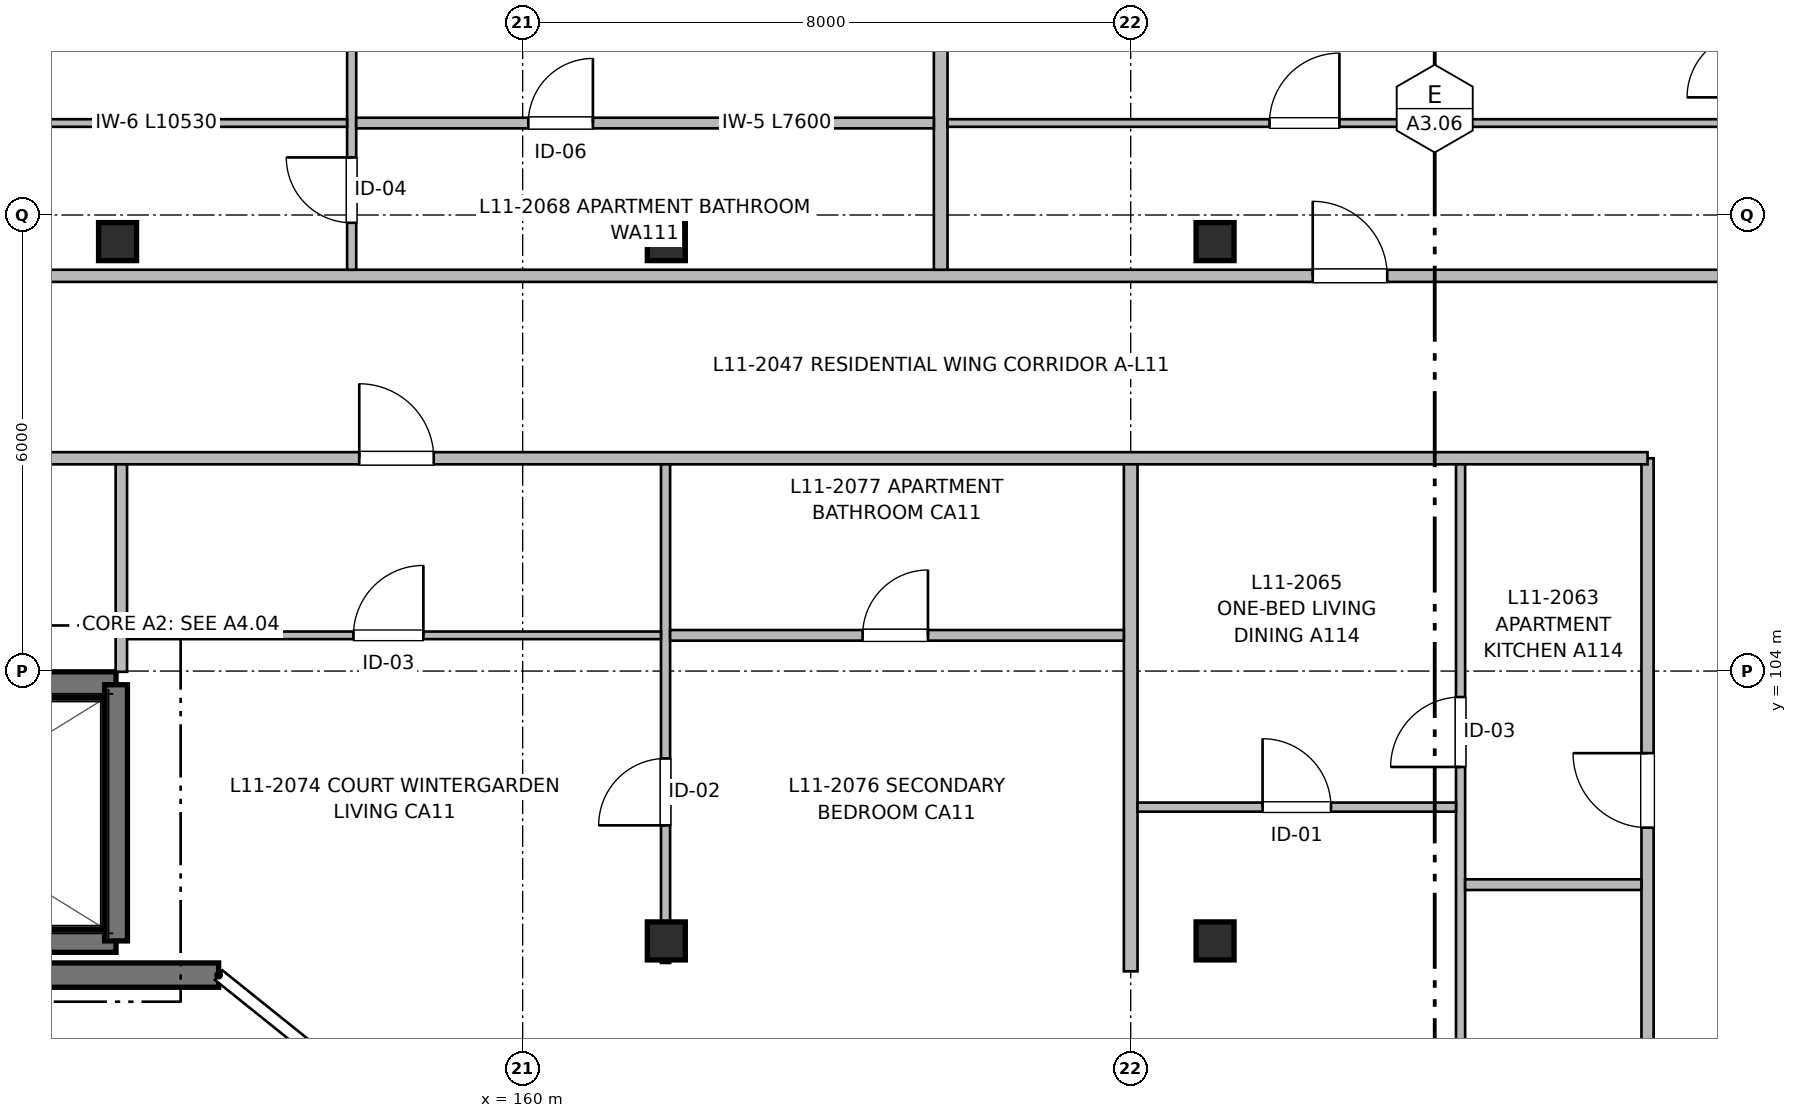
"""IFC4 building model, lengths in metres.
Left out: names, types, materials, properties, quantities, classifications, styles, units other than length and angle.
Written with IfcOpenShell. Run it as: python <this file> out.ifc"""

import sys

from ifc_helpers import new_model, si_unit, direction, frame, frame_2d, origin, origin_2d, place, context, subcontext, project, spatial, rectangle, extrude, element, fill, save


model = new_model("IFC4")
c1 = context("Model", 3, precision=1e-05, world=origin(), true_north=direction((0.0, 1.0)))
c2 = subcontext(c1, "Body", "Model", "MODEL_VIEW")
j1 = project(units=[si_unit("LENGTHUNIT", "METRE"), si_unit("PLANEANGLEUNIT", "RADIAN")], contexts=[c1])
p1 = place(None, origin())
s1 = spatial("IfcSite", under=j1, at=p1, CompositionType="ELEMENT")
p2 = place(p1, origin())
s2 = spatial("IfcBuilding", under=s1, at=p2, CompositionType="ELEMENT")
p3 = place(p2, frame((0.0, 0.0, 36.16)))
s3 = spatial("IfcBuildingStorey", under=s2, at=p3, CompositionType="ELEMENT", Elevation=36.16)
for number, where, z_axis, x_axis in (
    (1, (154.67, 109.65, 0.0), (0.0, 0.0, 1.0), (1.0, 0.0, 0.0)),
    (2, (161.89, 100.45, 0.0), (0.0, 0.0, 1.0), (1.0, 0.0, 0.0)),
    (3, (161.89, 109.65, 0.0), (0.0, 0.0, 1.0), (1.0, 0.0, 0.0)),
    (4, (169.11, 100.45, 0.0), (0.0, 0.0, 1.0), (1.0, 0.0, 0.0)),
    (5, (169.11, 109.65, 0.0), (0.0, 0.0, 1.0), (1.0, 0.0, 0.0)),
):
    element("IfcColumn", number, at=place(p3, frame(where, z_axis=z_axis, x_axis=x_axis)), inside=s3, PredefinedType="COLUMN", context=c2, shape_type="SweptSolid", body=[
        extrude(rectangle(XDim=0.5, YDim=0.5, at=origin_2d()), origin(), (0.0, 0.0, 1.0), 3.2),
    ])
p4 = place(p3, frame((147.75, 100.45, 0.0), z_axis=(0.0, 0.0, 1.0), x_axis=(1.0, 0.0, 0.0)))
e6 = element("IfcWall", 6, at=p4, inside=s3, PredefinedType="SHEAR", context=c2, shape_type="SweptSolid", body=[
    extrude(rectangle(XDim=6.9, YDim=0.3, at=frame_2d((3.45, 0.0))), origin(), (0.0, 0.0, 1.0), 3.2),
])
p5 = place(p3, frame((154.65, 103.82, 0.0), z_axis=(0.0, 0.0, 1.0), x_axis=(-1.0, 0.0, 0.0)))
e7 = element("IfcWall", 7, at=p5, inside=s3, PredefinedType="SHEAR", context=c2, shape_type="SweptSolid", body=[
    extrude(rectangle(XDim=6.9, YDim=0.34, at=frame_2d((3.45, 0.0))), origin(), (0.0, 0.0, 1.0), 3.2),
])
p6 = place(p5, frame((5.25, 0.0, 0.0)))
e8 = element("IfcOpeningElement", 8, at=p6, cuts=e7, PredefinedType="OPENING", context=c2, shape_type="SweptSolid", body=[
    extrude(rectangle(XDim=1.05, YDim=2.15, at=frame_2d((0.525, 1.075))), frame((0.0, 0.18, 0.0), z_axis=(0.0, -1.0, 0.0), x_axis=(1.0, 0.0, 0.0)), (0.0, 0.0, 1.0), 0.36),
])
p7 = place(p3, frame((154.65, 100.45, 0.0), z_axis=(0.0, 0.0, 1.0), x_axis=(0.0, 1.0, 0.0)))
e9 = element("IfcWall", 9, at=p7, inside=s3, PredefinedType="SHEAR", context=c2, shape_type="SweptSolid", body=[
    extrude(rectangle(XDim=3.37, YDim=0.3, at=frame_2d((1.685, 0.0))), origin(), (0.0, 0.0, 1.0), 3.2),
])
p8 = place(p3, frame((156.0, 100.0, 0.0), z_axis=(0.0, 0.0, 1.0), x_axis=(-1.0, 0.0, 0.0)))
e10 = element("IfcWall", 10, at=p8, inside=s3, PredefinedType="SHEAR", context=c2, shape_type="SweptSolid", body=[
    extrude(rectangle(XDim=9.0, YDim=0.32, at=frame_2d((4.5, 0.0))), origin(), (0.0, 0.0, 1.0), 2.98),
])
p9 = place(p8, frame((4.175, 0.0, 0.9)))
e11 = element("IfcOpeningElement", 11, at=p9, cuts=e10, PredefinedType="OPENING", context=c2, shape_type="SweptSolid", body=[
    extrude(rectangle(XDim=0.65, YDim=0.95, at=frame_2d((0.325, 0.475))), frame((0.0, 0.17, 0.0), z_axis=(0.0, -1.0, 0.0), x_axis=(1.0, 0.0, 0.0)), (0.0, 0.0, 1.0), 0.34),
])
p10 = place(p3, frame((174.8, 61.76, 0.0), z_axis=(0.0, 0.0, 1.0), x_axis=(0.0, 1.0, 0.0)))
e12 = element("IfcWall", 12, at=p10, inside=s3, PredefinedType="PARTITIONING", context=c2, shape_type="SweptSolid", body=[
    extrude(rectangle(XDim=45.04, YDim=0.16, at=frame_2d((22.52, 0.0))), origin(), (0.0, 0.0, 1.0), 2.935),
])
p11 = place(p10, frame((6.29, 0.0, 0.0)))
e13 = element("IfcOpeningElement", 13, at=p11, cuts=e12, PredefinedType="OPENING", context=c2, shape_type="SweptSolid", body=[
    extrude(rectangle(XDim=0.98, YDim=2.15, at=frame_2d((0.49, 1.075))), frame((0.0, 0.09, 0.0), z_axis=(0.0, -1.0, 0.0), x_axis=(1.0, 0.0, 0.0)), (0.0, 0.0, 1.0), 0.18),
])
p12 = place(p10, frame((19.09, 0.0, 0.0)))
e14 = element("IfcOpeningElement", 14, at=p12, cuts=e12, PredefinedType="OPENING", context=c2, shape_type="SweptSolid", body=[
    extrude(rectangle(XDim=1.02, YDim=2.15, at=frame_2d((0.51, 1.075))), frame((0.0, 0.09, 0.0), z_axis=(0.0, -1.0, 0.0), x_axis=(1.0, 0.0, 0.0)), (0.0, 0.0, 1.0), 0.18),
])
p13 = place(p10, frame((30.04, 0.0, 0.0)))
e15 = element("IfcOpeningElement", 15, at=p13, cuts=e12, PredefinedType="OPENING", context=c2, shape_type="SweptSolid", body=[
    extrude(rectangle(XDim=0.98, YDim=2.15, at=frame_2d((0.49, 1.075))), frame((0.0, 0.09, 0.0), z_axis=(0.0, -1.0, 0.0), x_axis=(1.0, 0.0, 0.0)), (0.0, 0.0, 1.0), 0.18),
])
p14 = place(p10, frame((40.18, 0.0, 0.0)))
e16 = element("IfcOpeningElement", 16, at=p14, cuts=e12, PredefinedType="OPENING", context=c2, shape_type="SweptSolid", body=[
    extrude(rectangle(XDim=0.98, YDim=2.15, at=frame_2d((0.49, 1.075))), frame((0.0, 0.09, 0.0), z_axis=(0.0, -1.0, 0.0), x_axis=(1.0, 0.0, 0.0)), (0.0, 0.0, 1.0), 0.18),
])
p15 = place(p3, frame((147.16, 106.8, 0.0), z_axis=(0.0, 0.0, 1.0), x_axis=(1.0, 0.0, 0.0)))
e17 = element("IfcWall", 17, at=p15, inside=s3, PredefinedType="PARTITIONING", context=c2, shape_type="SweptSolid", body=[
    extrude(rectangle(XDim=27.64, YDim=0.16, at=frame_2d((13.82, 0.0))), origin(), (0.0, 0.0, 1.0), 2.935),
])
p16 = place(p15, frame((3.515, 0.0, 0.0)))
e18 = element("IfcOpeningElement", 18, at=p16, cuts=e17, PredefinedType="OPENING", context=c2, shape_type="SweptSolid", body=[
    extrude(rectangle(XDim=1.05, YDim=2.15, at=frame_2d((0.525, 1.075))), frame((0.0, 0.09, 0.0), z_axis=(0.0, -1.0, 0.0), x_axis=(1.0, 0.0, 0.0)), (0.0, 0.0, 1.0), 0.18),
])
p17 = place(p15, frame((10.69, 0.0, 0.0)))
e19 = element("IfcOpeningElement", 19, at=p17, cuts=e17, PredefinedType="OPENING", context=c2, shape_type="SweptSolid", body=[
    extrude(rectangle(XDim=0.98, YDim=2.15, at=frame_2d((0.49, 1.075))), frame((0.0, 0.09, 0.0), z_axis=(0.0, -1.0, 0.0), x_axis=(1.0, 0.0, 0.0)), (0.0, 0.0, 1.0), 0.18),
])
p18 = place(p3, frame((147.16, 109.2, 0.0), z_axis=(0.0, 0.0, 1.0), x_axis=(1.0, 0.0, 0.0)))
e20 = element("IfcWall", 20, at=p18, inside=s3, PredefinedType="PARTITIONING", context=c2, shape_type="SweptSolid", body=[
    extrude(rectangle(XDim=36.68, YDim=0.16, at=frame_2d((18.34, 0.0))), origin(), (0.0, 0.0, 1.0), 2.935),
])
p19 = place(p18, frame((4.805, 0.0, 0.0)))
e21 = element("IfcOpeningElement", 21, at=p19, cuts=e20, PredefinedType="OPENING", context=c2, shape_type="SweptSolid", body=[
    extrude(rectangle(XDim=0.98, YDim=2.15, at=frame_2d((0.49, 1.075))), frame((0.0, 0.09, 0.0), z_axis=(0.0, -1.0, 0.0), x_axis=(1.0, 0.0, 0.0)), (0.0, 0.0, 1.0), 0.18),
])
p20 = place(p18, frame((23.235, 0.0, 0.0)))
e22 = element("IfcOpeningElement", 22, at=p20, cuts=e20, PredefinedType="OPENING", context=c2, shape_type="SweptSolid", body=[
    extrude(rectangle(XDim=0.98, YDim=2.15, at=frame_2d((0.49, 1.075))), frame((0.0, 0.09, 0.0), z_axis=(0.0, -1.0, 0.0), x_axis=(1.0, 0.0, 0.0)), (0.0, 0.0, 1.0), 0.18),
])
p21 = place(p3, frame((168.0, 100.05, 0.0), z_axis=(0.0, 0.0, 1.0), x_axis=(0.0, 1.0, 0.0)))
e23 = element("IfcWall", 23, at=p21, inside=s3, PredefinedType="PARTITIONING", context=c2, shape_type="SweptSolid", body=[
    extrude(rectangle(XDim=6.67, YDim=0.18, at=frame_2d((3.335, 0.0))), origin(), (0.0, 0.0, 1.0), 2.935),
])
p22 = place(p3, frame((154.72, 103.99, 0.0), z_axis=(0.0, 0.0, 1.0), x_axis=(0.0, 1.0, 0.0)))
e24 = element("IfcWall", 24, at=p22, inside=s3, PredefinedType="PARTITIONING", context=c2, shape_type="SweptSolid", body=[
    extrude(rectangle(XDim=2.73, YDim=0.15, at=frame_2d((1.365, 0.0))), origin(), (0.0, 0.0, 1.0), 2.935),
])
p23 = place(p3, frame((172.34, 96.47, 0.0), z_axis=(0.0, 0.0, 1.0), x_axis=(0.0, 1.0, 0.0)))
e25 = element("IfcWall", 25, at=p23, inside=s3, PredefinedType="PARTITIONING", context=c2, shape_type="SweptSolid", body=[
    extrude(rectangle(XDim=10.25, YDim=0.12, at=frame_2d((5.125, 0.0))), origin(), (0.0, 0.0, 1.0), 2.935),
])
p24 = place(p23, frame((1.794, 0.0, 0.0)))
e26 = element("IfcOpeningElement", 26, at=p24, cuts=e25, PredefinedType="OPENING", context=c2, shape_type="SweptSolid", body=[
    extrude(rectangle(XDim=0.86, YDim=2.1, at=frame_2d((0.43, 1.05))), frame((0.0, 0.07, 0.0), z_axis=(0.0, -1.0, 0.0), x_axis=(1.0, 0.0, 0.0)), (0.0, 0.0, 1.0), 0.14),
])
p25 = place(p23, frame((6.268, 0.0, 0.0)))
e27 = element("IfcOpeningElement", 27, at=p25, cuts=e25, PredefinedType="OPENING", context=c2, shape_type="SweptSolid", body=[
    extrude(rectangle(XDim=0.92, YDim=2.1, at=frame_2d((0.46, 1.05))), frame((0.0, 0.07, 0.0), z_axis=(0.0, -1.0, 0.0), x_axis=(1.0, 0.0, 0.0)), (0.0, 0.0, 1.0), 0.14),
])
p26 = place(p3, frame((172.4, 101.19, 0.0), z_axis=(0.0, 0.0, 1.0), x_axis=(1.0, 0.0, 0.0)))
e28 = element("IfcWall", 28, at=p26, inside=s3, PredefinedType="PARTITIONING", context=c2, shape_type="SweptSolid", body=[
    extrude(rectangle(XDim=2.32, YDim=0.14, at=frame_2d((1.16, 0.0))), origin(), (0.0, 0.0, 1.0), 2.935),
])
p27 = place(p3, frame((168.09, 102.21, 0.0), z_axis=(0.0, 0.0, 1.0), x_axis=(1.0, 0.0, 0.0)))
e29 = element("IfcWall", 29, at=p27, inside=s3, PredefinedType="PARTITIONING", context=c2, shape_type="SweptSolid", body=[
    extrude(rectangle(XDim=4.19, YDim=0.12, at=frame_2d((2.095, 0.0))), origin(), (0.0, 0.0, 1.0), 2.935),
])
p28 = place(p27, frame((1.645, 0.0, 0.0)))
e30 = element("IfcOpeningElement", 30, at=p28, cuts=e29, PredefinedType="OPENING", context=c2, shape_type="SweptSolid", body=[
    extrude(rectangle(XDim=0.9, YDim=2.1, at=frame_2d((0.45, 1.05))), frame((0.0, 0.07, 0.0), z_axis=(0.0, -1.0, 0.0), x_axis=(1.0, 0.0, 0.0)), (0.0, 0.0, 1.0), 0.14),
])
p29 = place(p3, frame((165.5, 109.28, 0.0), z_axis=(0.0, 0.0, 1.0), x_axis=(0.0, 1.0, 0.0)))
e31 = element("IfcWall", 31, at=p29, inside=s3, PredefinedType="PARTITIONING", context=c2, shape_type="SweptSolid", body=[
    extrude(rectangle(XDim=4.19, YDim=0.18, at=frame_2d((2.095, 0.0))), origin(), (0.0, 0.0, 1.0), 2.935),
])
p30 = place(p3, frame((157.75, 109.28, 0.0), z_axis=(0.0, 0.0, 1.0), x_axis=(0.0, 1.0, 0.0)))
e32 = element("IfcWall", 32, at=p30, inside=s3, PredefinedType="PARTITIONING", context=c2, shape_type="SweptSolid", body=[
    extrude(rectangle(XDim=4.19, YDim=0.12, at=frame_2d((2.095, 0.0))), origin(), (0.0, 0.0, 1.0), 2.935),
])
p31 = place(p30, frame((0.618, 0.0, 0.0)))
e33 = element("IfcOpeningElement", 33, at=p31, cuts=e32, PredefinedType="OPENING", context=c2, shape_type="SweptSolid", body=[
    extrude(rectangle(XDim=0.86, YDim=2.1, at=frame_2d((0.43, 1.05))), frame((0.0, 0.07, 0.0), z_axis=(0.0, -1.0, 0.0), x_axis=(1.0, 0.0, 0.0)), (0.0, 0.0, 1.0), 0.14),
])
p32 = place(p30, frame((2.947, 0.0, 0.0)))
e34 = element("IfcOpeningElement", 34, at=p32, cuts=e32, PredefinedType="OPENING", context=c2, shape_type="SweptSolid", body=[
    extrude(rectangle(XDim=0.9, YDim=2.1, at=frame_2d((0.45, 1.05))), frame((0.0, 0.07, 0.0), z_axis=(0.0, -1.0, 0.0), x_axis=(1.0, 0.0, 0.0)), (0.0, 0.0, 1.0), 0.14),
])
p33 = place(p3, frame((157.81, 111.21, 0.0), z_axis=(0.0, 0.0, 1.0), x_axis=(1.0, 0.0, 0.0)))
e35 = element("IfcWall", 35, at=p33, inside=s3, PredefinedType="PARTITIONING", context=c2, shape_type="SweptSolid", body=[
    extrude(rectangle(XDim=7.6, YDim=0.14, at=frame_2d((3.8, 0.0))), origin(), (0.0, 0.0, 1.0), 2.935),
])
p34 = place(p33, frame((2.264, 0.0, 0.0)))
e36 = element("IfcOpeningElement", 36, at=p34, cuts=e35, PredefinedType="OPENING", context=c2, shape_type="SweptSolid", body=[
    extrude(rectangle(XDim=0.85, YDim=2.05, at=frame_2d((0.425, 1.025))), frame((0.0, 0.08, 0.0), z_axis=(0.0, -1.0, 0.0), x_axis=(1.0, 0.0, 0.0)), (0.0, 0.0, 1.0), 0.16),
])
p35 = place(p3, frame((147.16, 111.21, 0.0), z_axis=(0.0, 0.0, 1.0), x_axis=(1.0, 0.0, 0.0)))
e37 = element("IfcWall", 37, at=p35, inside=s3, PredefinedType="PARTITIONING", context=c2, shape_type="SweptSolid", body=[
    extrude(rectangle(XDim=10.53, YDim=0.1, at=frame_2d((5.265, 0.0))), origin(), (0.0, 0.0, 1.0), 2.935),
])
p36 = place(p35, frame((4.236, 0.0, 0.0)))
e38 = element("IfcOpeningElement", 38, at=p36, cuts=e37, PredefinedType="OPENING", context=c2, shape_type="SweptSolid", body=[
    extrude(rectangle(XDim=0.92, YDim=2.1, at=frame_2d((0.46, 1.05))), frame((0.0, 0.06, 0.0), z_axis=(0.0, -1.0, 0.0), x_axis=(1.0, 0.0, 0.0)), (0.0, 0.0, 1.0), 0.12),
])
p37 = place(p3, frame((165.59, 111.21, 0.0), z_axis=(0.0, 0.0, 1.0), x_axis=(1.0, 0.0, 0.0)))
e39 = element("IfcWall", 39, at=p37, inside=s3, PredefinedType="PARTITIONING", context=c2, shape_type="SweptSolid", body=[
    extrude(rectangle(XDim=10.53, YDim=0.1, at=frame_2d((5.265, 0.0))), origin(), (0.0, 0.0, 1.0), 2.935),
])
p38 = place(p37, frame((4.236, 0.0, 0.0)))
e40 = element("IfcOpeningElement", 40, at=p38, cuts=e39, PredefinedType="OPENING", context=c2, shape_type="SweptSolid", body=[
    extrude(rectangle(XDim=0.92, YDim=2.1, at=frame_2d((0.46, 1.05))), frame((0.0, 0.06, 0.0), z_axis=(0.0, -1.0, 0.0), x_axis=(1.0, 0.0, 0.0)), (0.0, 0.0, 1.0), 0.12),
])
p39 = place(p3, frame((161.88, 100.16, 0.0), z_axis=(0.0, 0.0, 1.0), x_axis=(0.0, 1.0, 0.0)))
e41 = element("IfcWall", 41, at=p39, inside=s3, PredefinedType="PARTITIONING", context=c2, shape_type="SweptSolid", body=[
    extrude(rectangle(XDim=6.56, YDim=0.12, at=frame_2d((3.28, 0.0))), origin(), (0.0, 0.0, 1.0), 2.68),
])
p40 = place(p39, frame((1.81, 0.0, 0.0)))
e42 = element("IfcOpeningElement", 42, at=p40, cuts=e41, PredefinedType="OPENING", context=c2, shape_type="SweptSolid", body=[
    extrude(rectangle(XDim=0.88, YDim=2.1, at=frame_2d((0.44, 1.05))), frame((0.0, 0.07, 0.0), z_axis=(0.0, -1.0, 0.0), x_axis=(1.0, 0.0, 0.0)), (0.0, 0.0, 1.0), 0.14),
])
p41 = place(p3, frame((161.94, 104.47, 0.0), z_axis=(0.0, 0.0, 1.0), x_axis=(1.0, 0.0, 0.0)))
e43 = element("IfcWall", 43, at=p41, inside=s3, PredefinedType="PARTITIONING", context=c2, shape_type="SweptSolid", body=[
    extrude(rectangle(XDim=5.97, YDim=0.14, at=frame_2d((2.985, 0.0))), origin(), (0.0, 0.0, 1.0), 2.935),
])
p42 = place(p41, frame((2.533, 0.0, 0.0)))
e44 = element("IfcOpeningElement", 44, at=p42, cuts=e43, PredefinedType="OPENING", context=c2, shape_type="SweptSolid", body=[
    extrude(rectangle(XDim=0.86, YDim=2.1, at=frame_2d((0.43, 1.05))), frame((0.0, 0.08, 0.0), z_axis=(0.0, -1.0, 0.0), x_axis=(1.0, 0.0, 0.0)), (0.0, 0.0, 1.0), 0.16),
])
p43 = place(p3, frame((154.8, 104.47, 0.0), z_axis=(0.0, 0.0, 1.0), x_axis=(1.0, 0.0, 0.0)))
e45 = element("IfcWall", 45, at=p43, inside=s3, PredefinedType="PARTITIONING", context=c2, shape_type="SweptSolid", body=[
    extrude(rectangle(XDim=7.02, YDim=0.1, at=frame_2d((3.51, 0.0))), origin(), (0.0, 0.0, 1.0), 2.935),
])
p44 = place(p43, frame((2.974, 0.0, 0.0)))
e46 = element("IfcOpeningElement", 46, at=p44, cuts=e45, PredefinedType="OPENING", context=c2, shape_type="SweptSolid", body=[
    extrude(rectangle(XDim=0.92, YDim=2.1, at=frame_2d((0.46, 1.05))), frame((0.0, 0.06, 0.0), z_axis=(0.0, -1.0, 0.0), x_axis=(1.0, 0.0, 0.0)), (0.0, 0.0, 1.0), 0.12),
])
p45 = place(p25, origin())
e47 = element("IfcDoor", 47, at=p45, inside=s3, OperationType="SINGLE_SWING_LEFT", PredefinedType="DOOR", context=c2, shape_type="SweptSolid", body=[
    extrude(rectangle(XDim=0.92, YDim=2.1, at=frame_2d((0.46, 1.05))), frame((0.0, 0.025, 0.0), z_axis=(0.0, -1.0, 0.0), x_axis=(1.0, 0.0, 0.0)), (0.0, 0.0, 1.0), 0.05),
])
fill(e27, e47)
p46 = place(p14, origin())
e48 = element("IfcDoor", 48, at=p46, inside=s3, OperationType="SINGLE_SWING_RIGHT", PredefinedType="DOOR", context=c2, shape_type="SweptSolid", body=[
    extrude(rectangle(XDim=0.98, YDim=2.15, at=frame_2d((0.49, 1.075))), frame((0.0, 0.025, 0.0), z_axis=(0.0, -1.0, 0.0), x_axis=(1.0, 0.0, 0.0)), (0.0, 0.0, 1.0), 0.05),
])
fill(e16, e48)
p47 = place(p28, origin())
e49 = element("IfcDoor", 49, at=p47, inside=s3, OperationType="SINGLE_SWING_LEFT", PredefinedType="DOOR", context=c2, shape_type="SweptSolid", body=[
    extrude(rectangle(XDim=0.9, YDim=2.1, at=frame_2d((0.45, 1.05))), frame((0.0, 0.025, 0.0), z_axis=(0.0, -1.0, 0.0), x_axis=(1.0, 0.0, 0.0)), (0.0, 0.0, 1.0), 0.05),
])
fill(e30, e49)
p48 = place(p31, origin())
e50 = element("IfcDoor", 50, at=p48, inside=s3, OperationType="SINGLE_SWING_RIGHT", PredefinedType="DOOR", context=c2, shape_type="SweptSolid", body=[
    extrude(rectangle(XDim=0.86, YDim=2.1, at=frame_2d((0.43, 1.05))), frame((0.0, 0.025, 0.0), z_axis=(0.0, -1.0, 0.0), x_axis=(1.0, 0.0, 0.0)), (0.0, 0.0, 1.0), 0.05),
])
fill(e33, e50)
p49 = place(p34, origin())
e51 = element("IfcDoor", 51, at=p49, inside=s3, OperationType="SINGLE_SWING_RIGHT", PredefinedType="DOOR", context=c2, shape_type="SweptSolid", body=[
    extrude(rectangle(XDim=0.85, YDim=2.05, at=frame_2d((0.425, 1.025))), frame((0.0, 0.025, 0.0), z_axis=(0.0, -1.0, 0.0), x_axis=(1.0, 0.0, 0.0)), (0.0, 0.0, 1.0), 0.05),
])
fill(e36, e51)
p50 = place(p20, origin())
e52 = element("IfcDoor", 52, at=p50, inside=s3, OperationType="SINGLE_SWING_LEFT", PredefinedType="DOOR", context=c2, shape_type="SweptSolid", body=[
    extrude(rectangle(XDim=0.98, YDim=2.15, at=frame_2d((0.49, 1.075))), frame((0.0, 0.025, 0.0), z_axis=(0.0, -1.0, 0.0), x_axis=(1.0, 0.0, 0.0)), (0.0, 0.0, 1.0), 0.05),
])
fill(e22, e52)
p51 = place(p38, origin())
e53 = element("IfcDoor", 53, at=p51, inside=s3, OperationType="SINGLE_SWING_RIGHT", PredefinedType="DOOR", context=c2, shape_type="SweptSolid", body=[
    extrude(rectangle(XDim=0.92, YDim=2.1, at=frame_2d((0.46, 1.05))), frame((0.0, 0.025, 0.0), z_axis=(0.0, -1.0, 0.0), x_axis=(1.0, 0.0, 0.0)), (0.0, 0.0, 1.0), 0.05),
])
fill(e40, e53)
p52 = place(p17, origin())
e54 = element("IfcDoor", 54, at=p52, inside=s3, OperationType="SINGLE_SWING_LEFT", PredefinedType="DOOR", context=c2, shape_type="SweptSolid", body=[
    extrude(rectangle(XDim=0.98, YDim=2.15, at=frame_2d((0.49, 1.075))), frame((0.0, 0.025, 0.0), z_axis=(0.0, -1.0, 0.0), x_axis=(1.0, 0.0, 0.0)), (0.0, 0.0, 1.0), 0.05),
])
fill(e19, e54)
p53 = place(p44, origin())
e55 = element("IfcDoor", 55, at=p53, inside=s3, OperationType="SINGLE_SWING_RIGHT", PredefinedType="DOOR", context=c2, shape_type="SweptSolid", body=[
    extrude(rectangle(XDim=0.92, YDim=2.1, at=frame_2d((0.46, 1.05))), frame((0.0, 0.025, 0.0), z_axis=(0.0, -1.0, 0.0), x_axis=(1.0, 0.0, 0.0)), (0.0, 0.0, 1.0), 0.05),
])
fill(e46, e55)
p54 = place(p40, origin())
e56 = element("IfcDoor", 56, at=p54, inside=s3, OperationType="SINGLE_SWING_LEFT", PredefinedType="DOOR", context=c2, shape_type="SweptSolid", body=[
    extrude(rectangle(XDim=0.88, YDim=2.1, at=frame_2d((0.44, 1.05))), frame((0.0, 0.025, 0.0), z_axis=(0.0, -1.0, 0.0), x_axis=(1.0, 0.0, 0.0)), (0.0, 0.0, 1.0), 0.05),
])
fill(e42, e56)
p55 = place(p42, origin())
e57 = element("IfcDoor", 57, at=p55, inside=s3, OperationType="SINGLE_SWING_RIGHT", PredefinedType="DOOR", context=c2, shape_type="SweptSolid", body=[
    extrude(rectangle(XDim=0.86, YDim=2.1, at=frame_2d((0.43, 1.05))), frame((0.0, 0.025, 0.0), z_axis=(0.0, -1.0, 0.0), x_axis=(1.0, 0.0, 0.0)), (0.0, 0.0, 1.0), 0.05),
])
fill(e44, e57)
save(model, sys.argv[1])
